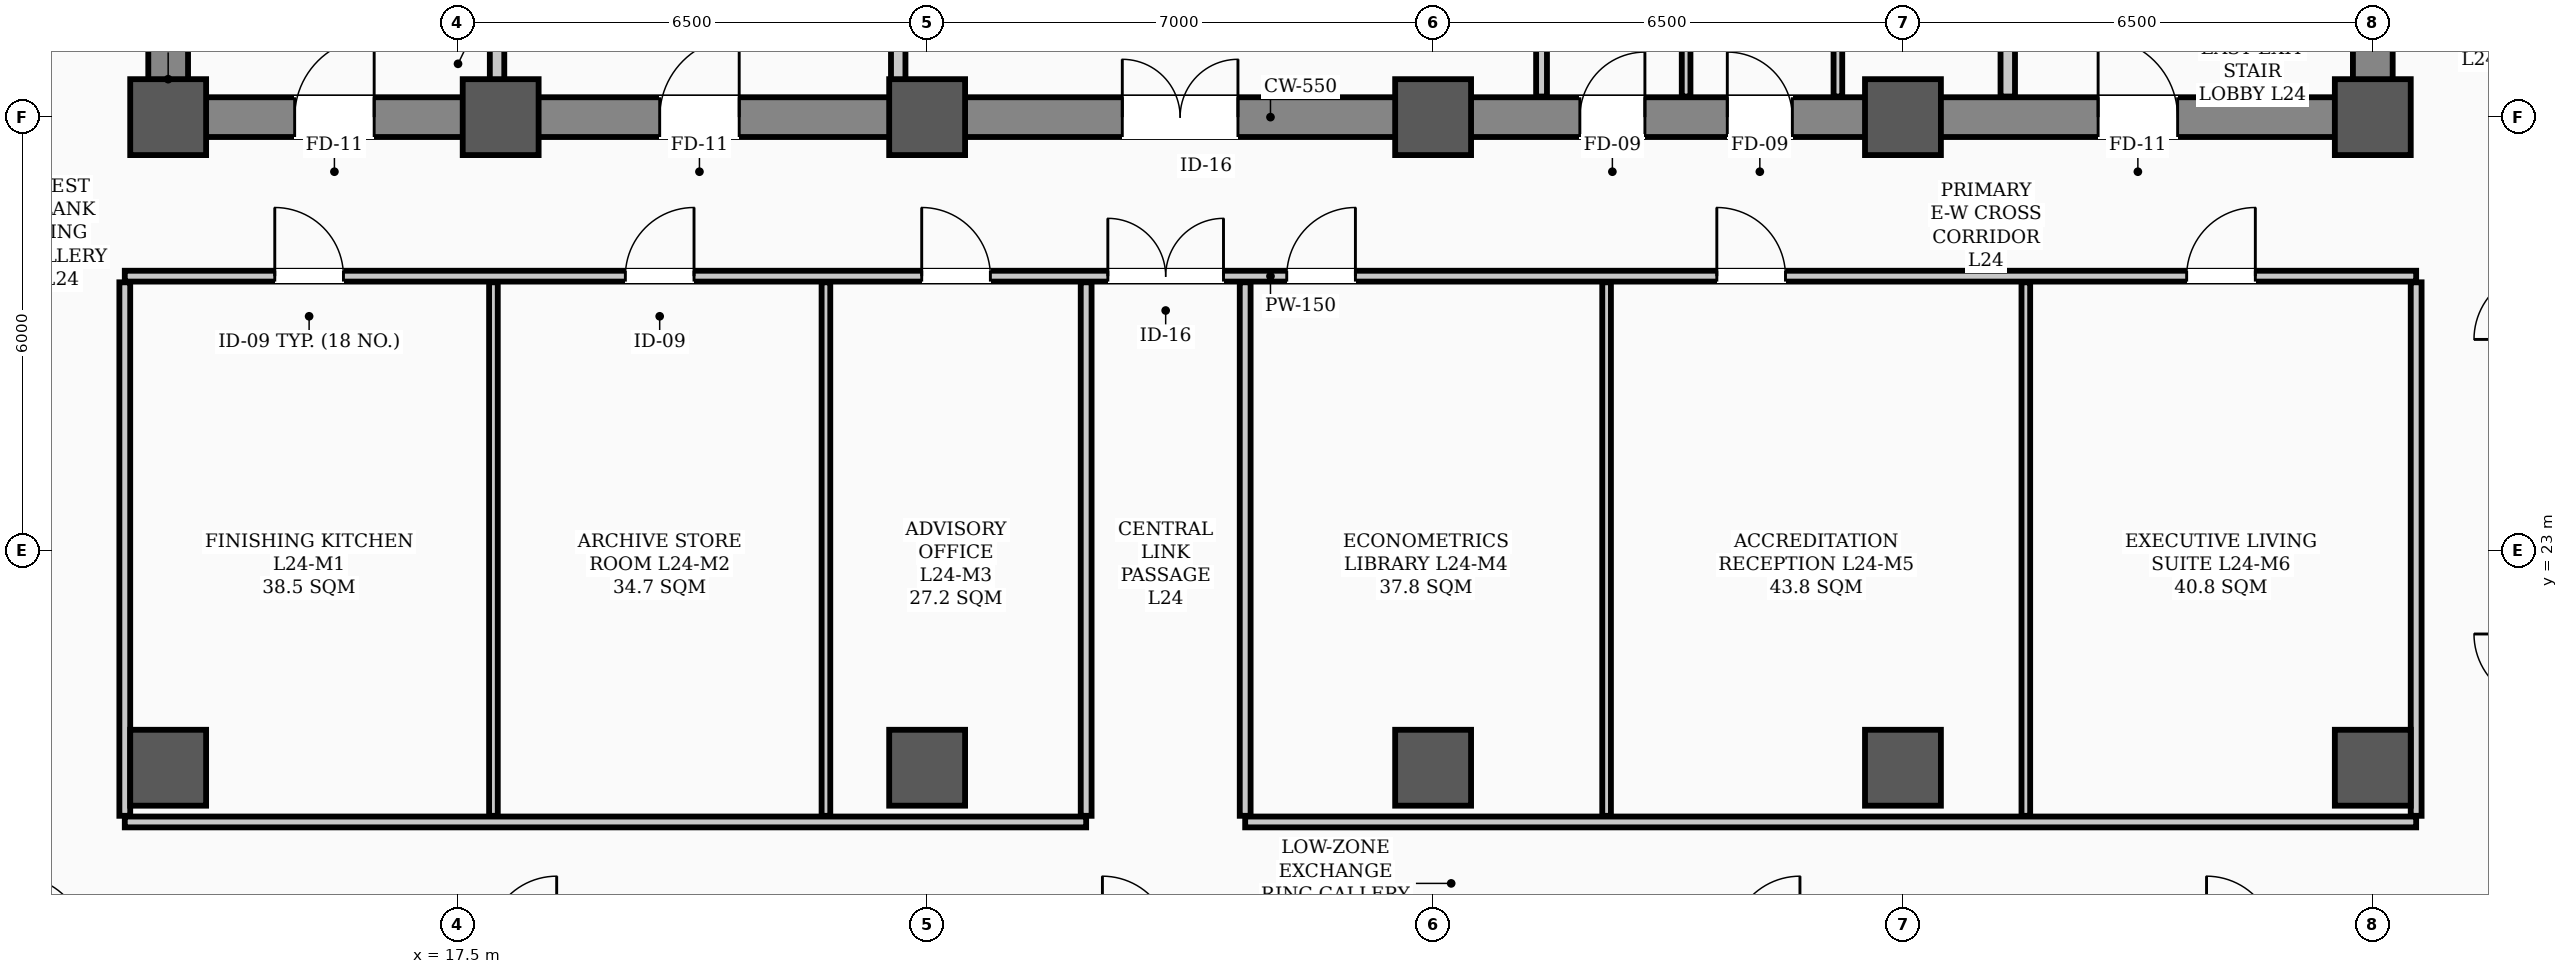
"""IFC4 building model, lengths in metres.
Left out: names, types, materials, properties, quantities, classifications, styles, units other than length and angle.
Written with IfcOpenShell. Run it as: python <this file> out.ifc"""

import sys

from ifc_helpers import new_model, si_unit, direction, frame, frame_2d, origin, origin_2d, place, context, subcontext, project, spatial, rectangle, hollow_rectangle, extrude, element, fill, save


model = new_model("IFC4")
c1 = context("Model", 3, precision=1e-05, world=origin(), true_north=direction((0.0, 1.0)))
c2 = subcontext(c1, "Body", "Model", "MODEL_VIEW")
j1 = project(units=[si_unit("LENGTHUNIT", "METRE"), si_unit("PLANEANGLEUNIT", "RADIAN")], contexts=[c1])
p1 = place(None, origin())
s1 = spatial("IfcSite", under=j1, at=p1, CompositionType="ELEMENT")
p2 = place(p1, origin())
s2 = spatial("IfcBuilding", under=s1, at=p2, CompositionType="ELEMENT")
p3 = place(p2, frame((0.0, 0.0, 96.7)))
s3 = spatial("IfcBuildingStorey", under=s2, at=p3, CompositionType="ELEMENT", Elevation=96.7)
for number, where, z_axis, x_axis in (
    (1, (13.5, 29.0, 0.0), (0.0, 0.0, 1.0), (1.0, 0.0, 0.0)),
    (2, (18.1, 29.0, 0.0), (0.0, 0.0, 1.0), (1.0, 0.0, 0.0)),
    (3, (24.0, 29.0, 0.0), (0.0, 0.0, 1.0), (1.0, 0.0, 0.0)),
    (4, (31.0, 29.0, 0.0), (0.0, 0.0, 1.0), (1.0, 0.0, 0.0)),
    (5, (37.5, 29.0, 0.0), (0.0, 0.0, 1.0), (1.0, 0.0, 0.0)),
    (6, (44.0, 29.0, 0.0), (0.0, 0.0, 1.0), (1.0, 0.0, 0.0)),
    (7, (13.5, 20.0, 0.0), (0.0, 0.0, 1.0), (1.0, 0.0, 0.0)),
    (8, (24.0, 20.0, 0.0), (0.0, 0.0, 1.0), (1.0, 0.0, 0.0)),
    (9, (31.0, 20.0, 0.0), (0.0, 0.0, 1.0), (1.0, 0.0, 0.0)),
    (10, (37.5, 20.0, 0.0), (0.0, 0.0, 1.0), (1.0, 0.0, 0.0)),
    (11, (44.0, 20.0, 0.0), (0.0, 0.0, 1.0), (1.0, 0.0, 0.0)),
):
    element("IfcColumn", number, at=place(p3, frame(where, z_axis=z_axis, x_axis=x_axis)), inside=s3, PredefinedType="COLUMN", context=c2, shape_type="SweptSolid", body=[
        extrude(hollow_rectangle(XDim=1.05, YDim=1.05, WallThickness=0.038, InnerFilletRadius=0.019, OuterFilletRadius=0.057, at=origin_2d()), origin(), (0.0, 0.0, 1.0), 3.9),
    ])
p4 = place(p3, frame((13.5, 29.0, 0.0), z_axis=(0.0, 0.0, 1.0), x_axis=(1.0, 0.0, 0.0)))
e12 = element("IfcWall", 12, at=p4, inside=s3, PredefinedType="SHEAR", context=c2, shape_type="SweptSolid", body=[
    extrude(rectangle(XDim=30.5, YDim=0.55, at=frame_2d((15.25, 0.0))), origin(), (0.0, 0.0, 1.0), 3.6),
])
p5 = place(p4, frame((1.75, 0.0, 0.0)))
e13 = element("IfcOpeningElement", 13, at=p5, cuts=e12, PredefinedType="OPENING", context=c2, shape_type="SweptSolid", body=[
    extrude(rectangle(XDim=1.1, YDim=2.08, at=frame_2d((0.55, 1.04))), frame((0.0, 0.285, 0.0), z_axis=(0.0, -1.0, 0.0), x_axis=(1.0, 0.0, 0.0)), (0.0, 0.0, 1.0), 0.57),
])
p6 = place(p4, frame((26.7, 0.0, 0.0)))
e14 = element("IfcOpeningElement", 14, at=p6, cuts=e12, PredefinedType="OPENING", context=c2, shape_type="SweptSolid", body=[
    extrude(rectangle(XDim=1.1, YDim=2.08, at=frame_2d((0.55, 1.04))), frame((0.0, 0.285, 0.0), z_axis=(0.0, -1.0, 0.0), x_axis=(1.0, 0.0, 0.0)), (0.0, 0.0, 1.0), 0.57),
])
p7 = place(p4, frame((6.8, 0.0, 0.0)))
e15 = element("IfcOpeningElement", 15, at=p7, cuts=e12, PredefinedType="OPENING", context=c2, shape_type="SweptSolid", body=[
    extrude(rectangle(XDim=1.1, YDim=2.08, at=frame_2d((0.55, 1.04))), frame((0.0, 0.285, 0.0), z_axis=(0.0, -1.0, 0.0), x_axis=(1.0, 0.0, 0.0)), (0.0, 0.0, 1.0), 0.57),
])
p8 = place(p4, frame((13.2, 0.0, 0.0)))
e16 = element("IfcOpeningElement", 16, at=p8, cuts=e12, PredefinedType="OPENING", context=c2, shape_type="SweptSolid", body=[
    extrude(rectangle(XDim=1.6, YDim=2.08, at=frame_2d((0.8, 1.04))), frame((0.0, 0.285, 0.0), z_axis=(0.0, -1.0, 0.0), x_axis=(1.0, 0.0, 0.0)), (0.0, 0.0, 1.0), 0.57),
])
p9 = place(p4, frame((19.53, 0.0, 0.0)))
e17 = element("IfcOpeningElement", 17, at=p9, cuts=e12, PredefinedType="OPENING", context=c2, shape_type="SweptSolid", body=[
    extrude(rectangle(XDim=0.9, YDim=2.08, at=frame_2d((0.45, 1.04))), frame((0.0, 0.285, 0.0), z_axis=(0.0, -1.0, 0.0), x_axis=(1.0, 0.0, 0.0)), (0.0, 0.0, 1.0), 0.57),
])
p10 = place(p4, frame((21.57, 0.0, 0.0)))
e18 = element("IfcOpeningElement", 18, at=p10, cuts=e12, PredefinedType="OPENING", context=c2, shape_type="SweptSolid", body=[
    extrude(rectangle(XDim=0.9, YDim=2.08, at=frame_2d((0.45, 1.04))), frame((0.0, 0.285, 0.0), z_axis=(0.0, -1.0, 0.0), x_axis=(1.0, 0.0, 0.0)), (0.0, 0.0, 1.0), 0.57),
])
for number, where, z_axis, x_axis in (
    (19, (13.5, 29.35, 0.0), (0.0, 0.0, 1.0), (0.0, 1.0, 0.0)),
    (20, (44.0, 29.35, 0.0), (0.0, 0.0, 1.0), (0.0, 1.0, 0.0)),
):
    element("IfcWall", number, at=place(p3, frame(where, z_axis=z_axis, x_axis=x_axis)), inside=s3, PredefinedType="SHEAR", context=c2, shape_type="SweptSolid", body=[
        extrude(rectangle(XDim=8.6, YDim=0.55, at=frame_2d((4.3, 0.0))), origin(), (0.0, 0.0, 1.0), 3.6),
    ])
p11 = place(p3, frame((12.9, 26.8, 0.0), z_axis=(0.0, 0.0, 1.0), x_axis=(1.0, 0.0, 0.0)))
e21 = element("IfcWall", 21, at=p11, inside=s3, PredefinedType="PARTITIONING", context=c2, shape_type="SweptSolid", body=[
    extrude(rectangle(XDim=31.7, YDim=0.15, at=frame_2d((15.85, 0.0))), origin(), (0.0, 0.0, 1.0), 2.18),
])
p12 = place(p11, frame((13.6, 0.0, 0.0)))
e22 = element("IfcOpeningElement", 22, at=p12, cuts=e21, PredefinedType="OPENING", context=c2, shape_type="SweptSolid", body=[
    extrude(rectangle(XDim=1.6, YDim=2.08, at=frame_2d((0.8, 1.04))), frame((0.0, 0.085, 0.0), z_axis=(0.0, -1.0, 0.0), x_axis=(1.0, 0.0, 0.0)), (0.0, 0.0, 1.0), 0.17),
])
p13 = place(p11, frame((2.075, 0.0, 0.0)))
e23 = element("IfcOpeningElement", 23, at=p13, cuts=e21, PredefinedType="OPENING", context=c2, shape_type="SweptSolid", body=[
    extrude(rectangle(XDim=0.95, YDim=2.08, at=frame_2d((0.475, 1.04))), frame((0.0, 0.085, 0.0), z_axis=(0.0, -1.0, 0.0), x_axis=(1.0, 0.0, 0.0)), (0.0, 0.0, 1.0), 0.17),
])
p14 = place(p11, frame((6.925, 0.0, 0.0)))
e24 = element("IfcOpeningElement", 24, at=p14, cuts=e21, PredefinedType="OPENING", context=c2, shape_type="SweptSolid", body=[
    extrude(rectangle(XDim=0.95, YDim=2.08, at=frame_2d((0.475, 1.04))), frame((0.0, 0.085, 0.0), z_axis=(0.0, -1.0, 0.0), x_axis=(1.0, 0.0, 0.0)), (0.0, 0.0, 1.0), 0.17),
])
p15 = place(p11, frame((11.025, 0.0, 0.0)))
e25 = element("IfcOpeningElement", 25, at=p15, cuts=e21, PredefinedType="OPENING", context=c2, shape_type="SweptSolid", body=[
    extrude(rectangle(XDim=0.95, YDim=2.08, at=frame_2d((0.475, 1.04))), frame((0.0, 0.085, 0.0), z_axis=(0.0, -1.0, 0.0), x_axis=(1.0, 0.0, 0.0)), (0.0, 0.0, 1.0), 0.17),
])
p16 = place(p11, frame((16.075, 0.0, 0.0)))
e26 = element("IfcOpeningElement", 26, at=p16, cuts=e21, PredefinedType="OPENING", context=c2, shape_type="SweptSolid", body=[
    extrude(rectangle(XDim=0.95, YDim=2.08, at=frame_2d((0.475, 1.04))), frame((0.0, 0.085, 0.0), z_axis=(0.0, -1.0, 0.0), x_axis=(1.0, 0.0, 0.0)), (0.0, 0.0, 1.0), 0.17),
])
p17 = place(p11, frame((22.025, 0.0, 0.0)))
e27 = element("IfcOpeningElement", 27, at=p17, cuts=e21, PredefinedType="OPENING", context=c2, shape_type="SweptSolid", body=[
    extrude(rectangle(XDim=0.95, YDim=2.08, at=frame_2d((0.475, 1.04))), frame((0.0, 0.085, 0.0), z_axis=(0.0, -1.0, 0.0), x_axis=(1.0, 0.0, 0.0)), (0.0, 0.0, 1.0), 0.17),
])
p18 = place(p11, frame((28.525, 0.0, 0.0)))
e28 = element("IfcOpeningElement", 28, at=p18, cuts=e21, PredefinedType="OPENING", context=c2, shape_type="SweptSolid", body=[
    extrude(rectangle(XDim=0.95, YDim=2.08, at=frame_2d((0.475, 1.04))), frame((0.0, 0.085, 0.0), z_axis=(0.0, -1.0, 0.0), x_axis=(1.0, 0.0, 0.0)), (0.0, 0.0, 1.0), 0.17),
])
p19 = place(p3, frame((12.9, 19.25, 0.0), z_axis=(0.0, 0.0, 1.0), x_axis=(1.0, 0.0, 0.0)))
e29 = element("IfcWall", 29, at=p19, inside=s3, PredefinedType="PARTITIONING", context=c2, shape_type="SweptSolid", body=[
    extrude(rectangle(XDim=13.3, YDim=0.15, at=frame_2d((6.65, 0.0))), origin(), (0.0, 0.0, 1.0), 2.18),
])
p20 = place(p3, frame((28.4, 19.25, 0.0), z_axis=(0.0, 0.0, 1.0), x_axis=(1.0, 0.0, 0.0)))
e30 = element("IfcWall", 30, at=p20, inside=s3, PredefinedType="PARTITIONING", context=c2, shape_type="SweptSolid", body=[
    extrude(rectangle(XDim=16.2, YDim=0.15, at=frame_2d((8.1, 0.0))), origin(), (0.0, 0.0, 1.0), 2.18),
])
for number, where, z_axis, x_axis in (
    (31, (18.05, 29.285, 0.0), (0.0, 0.0, 1.0), (0.0, 1.0, 0.0)),
    (32, (38.95, 29.285, 0.0), (0.0, 0.0, 1.0), (0.0, 1.0, 0.0)),
):
    element("IfcWall", number, at=place(p3, frame(where, z_axis=z_axis, x_axis=x_axis)), inside=s3, PredefinedType="STANDARD", context=c2, shape_type="SweptSolid", body=[
        extrude(rectangle(XDim=1.015, YDim=0.2, at=frame_2d((0.508, 0.0))), origin(), (0.0, 0.0, 1.0), 2.18),
    ])
p21 = place(p3, frame((23.6, 29.285, 0.0), z_axis=(0.0, 0.0, 1.0), x_axis=(0.0, 1.0, 0.0)))
e33 = element("IfcWall", 33, at=p21, inside=s3, PredefinedType="STANDARD", context=c2, shape_type="SweptSolid", body=[
    extrude(rectangle(XDim=5.415, YDim=0.2, at=frame_2d((2.708, 0.0))), origin(), (0.0, 0.0, 1.0), 2.18),
])
p22 = place(p3, frame((32.5, 29.285, 0.0), z_axis=(0.0, 0.0, 1.0), x_axis=(0.0, 1.0, 0.0)))
e34 = element("IfcWall", 34, at=p22, inside=s3, PredefinedType="PARTITIONING", context=c2, shape_type="SweptSolid", body=[
    extrude(rectangle(XDim=2.48, YDim=0.15, at=frame_2d((1.24, 0.0))), origin(), (0.0, 0.0, 1.0), 2.18),
])
for number, where, z_axis, x_axis in (
    (35, (36.6, 29.285, 0.0), (0.0, 0.0, 1.0), (0.0, 1.0, 0.0)),
    (36, (34.5, 29.285, 0.0), (0.0, 0.0, 1.0), (0.0, 1.0, 0.0)),
):
    element("IfcWall", number, at=place(p3, frame(where, z_axis=z_axis, x_axis=x_axis)), inside=s3, PredefinedType="PARTITIONING", context=c2, shape_type="SweptSolid", body=[
        extrude(rectangle(XDim=2.48, YDim=0.12, at=frame_2d((1.24, 0.0))), origin(), (0.0, 0.0, 1.0), 2.18),
    ])
for number, where, z_axis, x_axis in (
    (37, (26.2, 19.335, 0.0), (0.0, 0.0, 1.0), (0.0, 1.0, 0.0)),
    (38, (28.4, 19.335, 0.0), (0.0, 0.0, 1.0), (0.0, 1.0, 0.0)),
    (39, (12.9, 19.335, 0.0), (0.0, 0.0, 1.0), (0.0, 1.0, 0.0)),
    (40, (44.6, 19.335, 0.0), (0.0, 0.0, 1.0), (0.0, 1.0, 0.0)),
):
    element("IfcWall", number, at=place(p3, frame(where, z_axis=z_axis, x_axis=x_axis)), inside=s3, PredefinedType="PARTITIONING", context=c2, shape_type="SweptSolid", body=[
        extrude(rectangle(XDim=7.38, YDim=0.15, at=frame_2d((3.69, 0.0))), origin(), (0.0, 0.0, 1.0), 2.18),
    ])
for number, where, z_axis, x_axis in (
    (41, (18.0, 19.335, 0.0), (0.0, 0.0, 1.0), (0.0, 1.0, 0.0)),
    (42, (22.6, 19.335, 0.0), (0.0, 0.0, 1.0), (0.0, 1.0, 0.0)),
    (43, (33.4, 19.335, 0.0), (0.0, 0.0, 1.0), (0.0, 1.0, 0.0)),
    (44, (39.2, 19.335, 0.0), (0.0, 0.0, 1.0), (0.0, 1.0, 0.0)),
):
    element("IfcWall", number, at=place(p3, frame(where, z_axis=z_axis, x_axis=x_axis)), inside=s3, PredefinedType="PARTITIONING", context=c2, shape_type="SweptSolid", body=[
        extrude(rectangle(XDim=7.38, YDim=0.12, at=frame_2d((3.69, 0.0))), origin(), (0.0, 0.0, 1.0), 2.18),
    ])
p23 = place(p5, origin())
e45 = element("IfcDoor", 45, at=p23, inside=s3, OperationType="SINGLE_SWING_RIGHT", PredefinedType="DOOR", context=c2, shape_type="SweptSolid", body=[
    extrude(rectangle(XDim=1.1, YDim=2.08, at=frame_2d((0.55, 1.04))), frame((0.0, 0.025, 0.0), z_axis=(0.0, -1.0, 0.0), x_axis=(1.0, 0.0, 0.0)), (0.0, 0.0, 1.0), 0.05),
])
fill(e13, e45)
p24 = place(p6, origin())
e46 = element("IfcDoor", 46, at=p24, inside=s3, OperationType="SINGLE_SWING_LEFT", PredefinedType="DOOR", context=c2, shape_type="SweptSolid", body=[
    extrude(rectangle(XDim=1.1, YDim=2.08, at=frame_2d((0.55, 1.04))), frame((0.0, 0.025, 0.0), z_axis=(0.0, -1.0, 0.0), x_axis=(1.0, 0.0, 0.0)), (0.0, 0.0, 1.0), 0.05),
])
fill(e14, e46)
p25 = place(p7, origin())
e47 = element("IfcDoor", 47, at=p25, inside=s3, OperationType="SINGLE_SWING_RIGHT", PredefinedType="DOOR", context=c2, shape_type="SweptSolid", body=[
    extrude(rectangle(XDim=1.1, YDim=2.08, at=frame_2d((0.55, 1.04))), frame((0.0, 0.025, 0.0), z_axis=(0.0, -1.0, 0.0), x_axis=(1.0, 0.0, 0.0)), (0.0, 0.0, 1.0), 0.05),
])
fill(e15, e47)
p26 = place(p8, origin())
e48 = element("IfcDoor", 48, at=p26, inside=s3, OperationType="DOUBLE_DOOR_SINGLE_SWING", PredefinedType="DOOR", context=c2, shape_type="SweptSolid", body=[
    extrude(rectangle(XDim=1.6, YDim=2.08, at=frame_2d((0.8, 1.04))), frame((0.0, 0.025, 0.0), z_axis=(0.0, -1.0, 0.0), x_axis=(1.0, 0.0, 0.0)), (0.0, 0.0, 1.0), 0.05),
])
fill(e16, e48)
p27 = place(p9, origin())
e49 = element("IfcDoor", 49, at=p27, inside=s3, OperationType="SINGLE_SWING_RIGHT", PredefinedType="DOOR", context=c2, shape_type="SweptSolid", body=[
    extrude(rectangle(XDim=0.9, YDim=2.08, at=frame_2d((0.45, 1.04))), frame((0.0, 0.025, 0.0), z_axis=(0.0, -1.0, 0.0), x_axis=(1.0, 0.0, 0.0)), (0.0, 0.0, 1.0), 0.05),
])
fill(e17, e49)
p28 = place(p10, origin())
e50 = element("IfcDoor", 50, at=p28, inside=s3, OperationType="SINGLE_SWING_LEFT", PredefinedType="DOOR", context=c2, shape_type="SweptSolid", body=[
    extrude(rectangle(XDim=0.9, YDim=2.08, at=frame_2d((0.45, 1.04))), frame((0.0, 0.025, 0.0), z_axis=(0.0, -1.0, 0.0), x_axis=(1.0, 0.0, 0.0)), (0.0, 0.0, 1.0), 0.05),
])
fill(e18, e50)
p29 = place(p12, origin())
e51 = element("IfcDoor", 51, at=p29, inside=s3, OperationType="DOUBLE_DOOR_SINGLE_SWING", PredefinedType="DOOR", context=c2, shape_type="SweptSolid", body=[
    extrude(rectangle(XDim=1.6, YDim=2.08, at=frame_2d((0.8, 1.04))), frame((0.0, 0.025, 0.0), z_axis=(0.0, -1.0, 0.0), x_axis=(1.0, 0.0, 0.0)), (0.0, 0.0, 1.0), 0.05),
])
fill(e22, e51)
p30 = place(p13, origin())
e52 = element("IfcDoor", 52, at=p30, inside=s3, OperationType="SINGLE_SWING_LEFT", PredefinedType="DOOR", context=c2, shape_type="SweptSolid", body=[
    extrude(rectangle(XDim=0.95, YDim=2.08, at=frame_2d((0.475, 1.04))), frame((0.0, 0.025, 0.0), z_axis=(0.0, -1.0, 0.0), x_axis=(1.0, 0.0, 0.0)), (0.0, 0.0, 1.0), 0.05),
])
fill(e23, e52)
p31 = place(p14, origin())
e53 = element("IfcDoor", 53, at=p31, inside=s3, OperationType="SINGLE_SWING_RIGHT", PredefinedType="DOOR", context=c2, shape_type="SweptSolid", body=[
    extrude(rectangle(XDim=0.95, YDim=2.08, at=frame_2d((0.475, 1.04))), frame((0.0, 0.025, 0.0), z_axis=(0.0, -1.0, 0.0), x_axis=(1.0, 0.0, 0.0)), (0.0, 0.0, 1.0), 0.05),
])
fill(e24, e53)
p32 = place(p15, origin())
e54 = element("IfcDoor", 54, at=p32, inside=s3, OperationType="SINGLE_SWING_LEFT", PredefinedType="DOOR", context=c2, shape_type="SweptSolid", body=[
    extrude(rectangle(XDim=0.95, YDim=2.08, at=frame_2d((0.475, 1.04))), frame((0.0, 0.025, 0.0), z_axis=(0.0, -1.0, 0.0), x_axis=(1.0, 0.0, 0.0)), (0.0, 0.0, 1.0), 0.05),
])
fill(e25, e54)
p33 = place(p16, origin())
e55 = element("IfcDoor", 55, at=p33, inside=s3, OperationType="SINGLE_SWING_RIGHT", PredefinedType="DOOR", context=c2, shape_type="SweptSolid", body=[
    extrude(rectangle(XDim=0.95, YDim=2.08, at=frame_2d((0.475, 1.04))), frame((0.0, 0.025, 0.0), z_axis=(0.0, -1.0, 0.0), x_axis=(1.0, 0.0, 0.0)), (0.0, 0.0, 1.0), 0.05),
])
fill(e26, e55)
p34 = place(p17, origin())
e56 = element("IfcDoor", 56, at=p34, inside=s3, OperationType="SINGLE_SWING_LEFT", PredefinedType="DOOR", context=c2, shape_type="SweptSolid", body=[
    extrude(rectangle(XDim=0.95, YDim=2.08, at=frame_2d((0.475, 1.04))), frame((0.0, 0.025, 0.0), z_axis=(0.0, -1.0, 0.0), x_axis=(1.0, 0.0, 0.0)), (0.0, 0.0, 1.0), 0.05),
])
fill(e27, e56)
p35 = place(p18, origin())
e57 = element("IfcDoor", 57, at=p35, inside=s3, OperationType="SINGLE_SWING_RIGHT", PredefinedType="DOOR", context=c2, shape_type="SweptSolid", body=[
    extrude(rectangle(XDim=0.95, YDim=2.08, at=frame_2d((0.475, 1.04))), frame((0.0, 0.025, 0.0), z_axis=(0.0, -1.0, 0.0), x_axis=(1.0, 0.0, 0.0)), (0.0, 0.0, 1.0), 0.05),
])
fill(e28, e57)
save(model, sys.argv[1])
